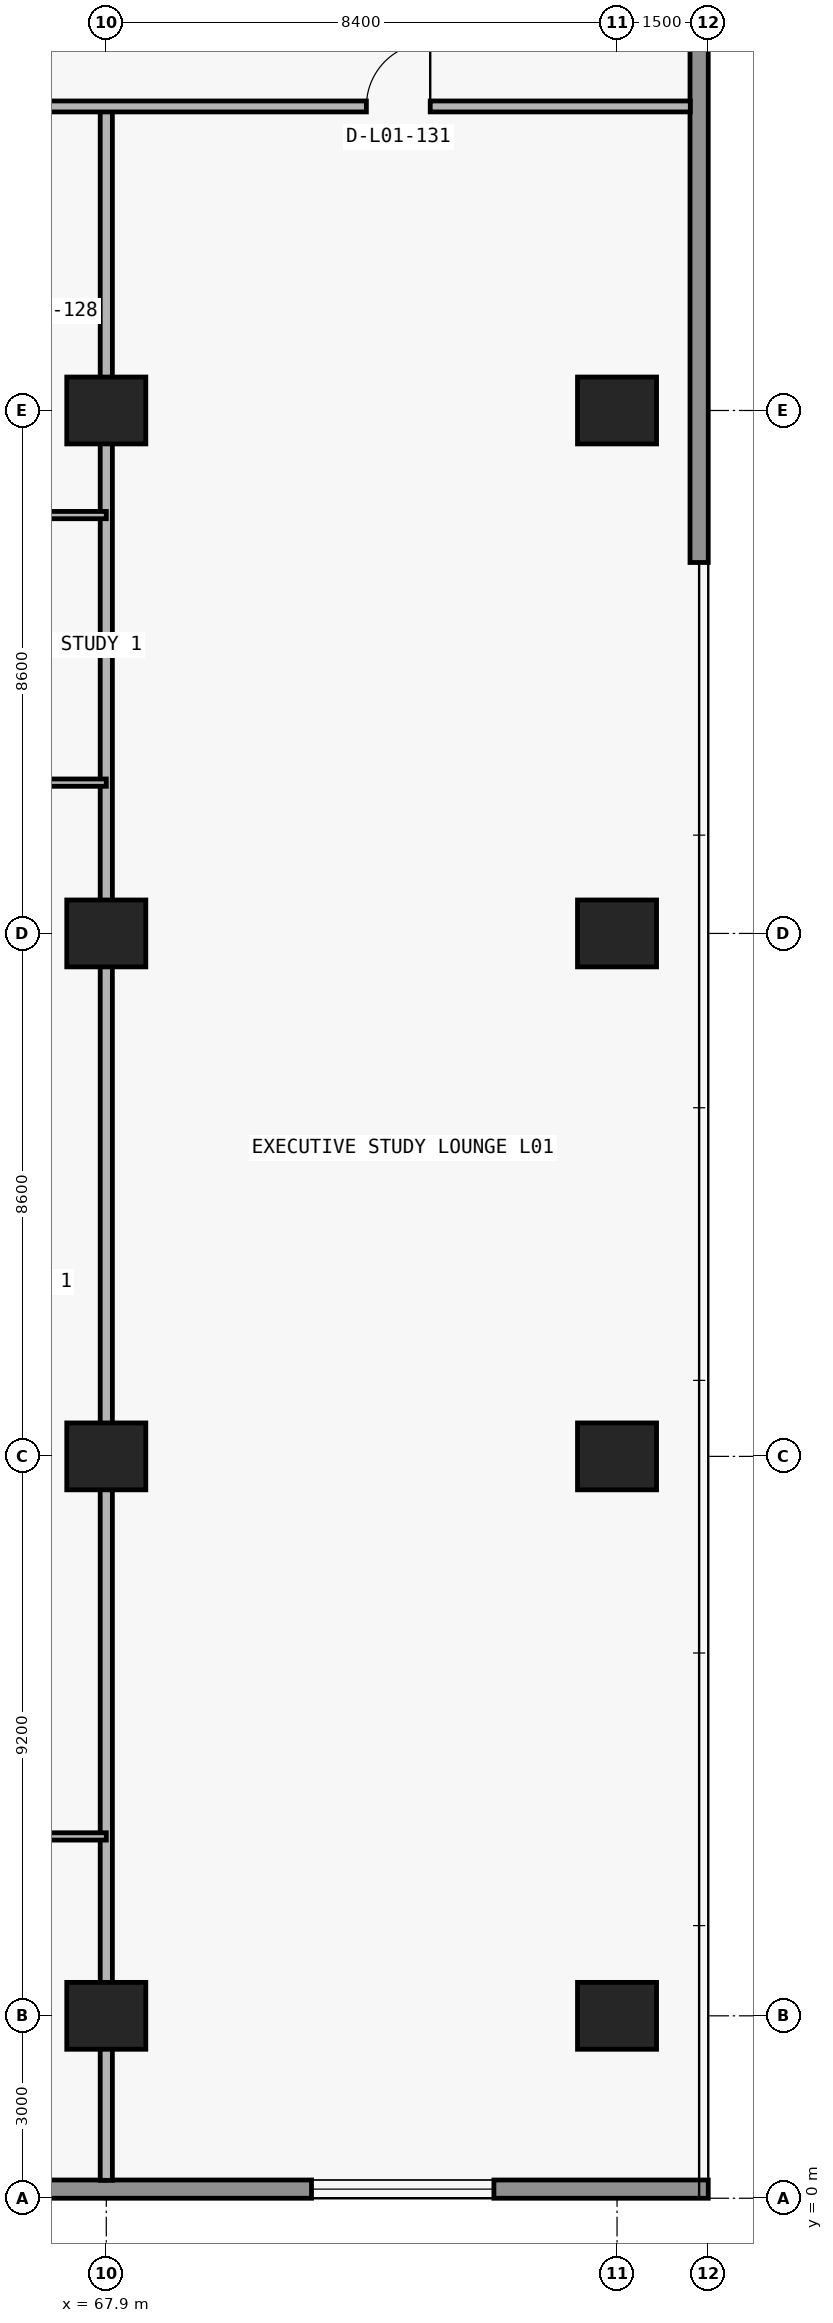
"""IFC4 building model, lengths in metres.
Left out: names, types, materials, properties, quantities, classifications, styles, units other than length and angle.
Written with IfcOpenShell. Run it as: python <this file> out.ifc"""

import sys

from ifc_helpers import new_model, si_unit, direction, frame, frame_2d, origin, origin_2d, place, context, subcontext, project, spatial, rectangle, extrude, element, fill, save


model = new_model("IFC4")
c1 = context("Model", 3, precision=1e-05, world=origin(), true_north=direction((0.0, 1.0)))
c2 = subcontext(c1, "Body", "Model", "MODEL_VIEW")
j1 = project(units=[si_unit("LENGTHUNIT", "METRE"), si_unit("PLANEANGLEUNIT", "RADIAN")], contexts=[c1])
p1 = place(None, origin())
s1 = spatial("IfcSite", under=j1, at=p1, CompositionType="ELEMENT")
p2 = place(p1, origin())
s2 = spatial("IfcBuilding", under=s1, at=p2, CompositionType="ELEMENT")
p3 = place(p2, frame((0.0, 0.0, 5.4)))
s3 = spatial("IfcBuildingStorey", under=s2, at=p3, CompositionType="ELEMENT", Elevation=5.4)
for number, where, z_axis, x_axis in (
    (1, (67.9, 3.0, 0.0), (0.0, 0.0, 1.0), (1.0, 0.0, 0.0)),
    (2, (76.3, 3.0, 0.0), (0.0, 0.0, 1.0), (1.0, 0.0, 0.0)),
    (3, (67.9, 12.2, 0.0), (0.0, 0.0, 1.0), (1.0, 0.0, 0.0)),
    (4, (76.3, 12.2, 0.0), (0.0, 0.0, 1.0), (1.0, 0.0, 0.0)),
    (5, (67.9, 20.8, 0.0), (0.0, 0.0, 1.0), (1.0, 0.0, 0.0)),
    (6, (76.3, 20.8, 0.0), (0.0, 0.0, 1.0), (1.0, 0.0, 0.0)),
    (7, (67.9, 29.4, 0.0), (0.0, 0.0, 1.0), (1.0, 0.0, 0.0)),
    (8, (76.3, 29.4, 0.0), (0.0, 0.0, 1.0), (1.0, 0.0, 0.0)),
):
    element("IfcColumn", number, at=place(p3, frame(where, z_axis=z_axis, x_axis=x_axis)), inside=s3, PredefinedType="COLUMN", context=c2, shape_type="SweptSolid", body=[
        extrude(rectangle(XDim=1.3, YDim=1.1, at=origin_2d()), origin(), (0.0, 0.0, 1.0), 4.5),
    ])
p4 = place(p3, frame((77.8, 0.15, 0.0), z_axis=(0.0, 0.0, 1.0), x_axis=(-1.0, 0.0, 0.0)))
e9 = element("IfcWall", 9, at=p4, inside=s3, PredefinedType="STANDARD", context=c2, shape_type="SweptSolid", body=[
    extrude(rectangle(XDim=77.8, YDim=0.3, at=frame_2d((38.9, 0.0))), origin(), (0.0, 0.0, 1.0), 4.5),
])
p5 = place(p4, frame((62.875, 0.0, 0.85)))
e10 = element("IfcOpeningElement", 10, at=p5, cuts=e9, PredefinedType="OPENING", context=c2, shape_type="SweptSolid", body=[
    extrude(rectangle(XDim=3.0, YDim=2.4, at=frame_2d((1.5, 1.2))), frame((0.0, 0.16, 0.0), z_axis=(0.0, -1.0, 0.0), x_axis=(1.0, 0.0, 0.0)), (0.0, 0.0, 1.0), 0.32),
])
p6 = place(p4, frame((37.4, 0.0, 0.85)))
e11 = element("IfcOpeningElement", 11, at=p6, cuts=e9, PredefinedType="OPENING", context=c2, shape_type="SweptSolid", body=[
    extrude(rectangle(XDim=3.0, YDim=2.4, at=frame_2d((1.5, 1.2))), frame((0.0, 0.16, 0.0), z_axis=(0.0, -1.0, 0.0), x_axis=(1.0, 0.0, 0.0)), (0.0, 0.0, 1.0), 0.32),
])
p7 = place(p4, frame((21.0, 0.0, 0.85)))
e12 = element("IfcOpeningElement", 12, at=p7, cuts=e9, PredefinedType="OPENING", context=c2, shape_type="SweptSolid", body=[
    extrude(rectangle(XDim=3.0, YDim=2.4, at=frame_2d((1.5, 1.2))), frame((0.0, 0.16, 0.0), z_axis=(0.0, -1.0, 0.0), x_axis=(1.0, 0.0, 0.0)), (0.0, 0.0, 1.0), 0.32),
])
p8 = place(p4, frame((13.0, 0.0, 0.85)))
e13 = element("IfcOpeningElement", 13, at=p8, cuts=e9, PredefinedType="OPENING", context=c2, shape_type="SweptSolid", body=[
    extrude(rectangle(XDim=2.2, YDim=1.55, at=frame_2d((1.1, 0.775))), frame((0.0, 0.16, 0.0), z_axis=(0.0, -1.0, 0.0), x_axis=(1.0, 0.0, 0.0)), (0.0, 0.0, 1.0), 0.32),
])
p9 = place(p4, frame((3.525, 0.0, 0.85)))
e14 = element("IfcOpeningElement", 14, at=p9, cuts=e9, PredefinedType="OPENING", context=c2, shape_type="SweptSolid", body=[
    extrude(rectangle(XDim=3.0, YDim=2.4, at=frame_2d((1.5, 1.2))), frame((0.0, 0.16, 0.0), z_axis=(0.0, -1.0, 0.0), x_axis=(1.0, 0.0, 0.0)), (0.0, 0.0, 1.0), 0.32),
])
p10 = place(p3, frame((77.65, 53.8, 0.0), z_axis=(0.0, 0.0, 1.0), x_axis=(0.0, -1.0, 0.0)))
e15 = element("IfcWall", 15, at=p10, inside=s3, PredefinedType="STANDARD", context=c2, shape_type="SweptSolid", body=[
    extrude(rectangle(XDim=26.9, YDim=0.3, at=frame_2d((13.45, 0.0))), origin(), (0.0, 0.0, 1.0), 4.5),
])
p11 = place(p3, frame((67.9, 0.295, 0.0), z_axis=(0.0, 0.0, 1.0), x_axis=(0.0, 1.0, 0.0)))
e16 = element("IfcWall", 16, at=p11, inside=s3, PredefinedType="PARTITIONING", context=c2, shape_type="SweptSolid", body=[
    extrude(rectangle(XDim=34.105, YDim=0.2, at=frame_2d((17.052, 0.0))), origin(), (0.0, 0.0, 1.0), 3.464),
])
p12 = place(p3, frame((59.5, 5.95, 0.0), z_axis=(0.0, 0.0, 1.0), x_axis=(1.0, 0.0, 0.0)))
e17 = element("IfcWall", 17, at=p12, inside=s3, PredefinedType="PARTITIONING", context=c2, shape_type="SweptSolid", body=[
    extrude(rectangle(XDim=8.4, YDim=0.12, at=frame_2d((4.2, 0.0))), origin(), (0.0, 0.0, 1.0), 4.5),
])
p13 = place(p12, frame((3.75, 0.0, 0.0)))
e18 = element("IfcOpeningElement", 18, at=p13, cuts=e17, PredefinedType="OPENING", context=c2, shape_type="SweptSolid", body=[
    extrude(rectangle(XDim=0.9, YDim=2.15, at=frame_2d((0.45, 1.075))), frame((0.0, 0.07, 0.0), z_axis=(0.0, -1.0, 0.0), x_axis=(1.0, 0.0, 0.0)), (0.0, 0.0, 1.0), 0.14),
])
p14 = place(p3, frame((59.5, 23.28, 0.0), z_axis=(0.0, 0.0, 1.0), x_axis=(1.0, 0.0, 0.0)))
e19 = element("IfcWall", 19, at=p14, inside=s3, PredefinedType="PARTITIONING", context=c2, shape_type="SweptSolid", body=[
    extrude(rectangle(XDim=8.4, YDim=0.12, at=frame_2d((4.2, 0.0))), origin(), (0.0, 0.0, 1.0), 4.5),
])
p15 = place(p14, frame((3.75, 0.0, 0.0)))
e20 = element("IfcOpeningElement", 20, at=p15, cuts=e19, PredefinedType="OPENING", context=c2, shape_type="SweptSolid", body=[
    extrude(rectangle(XDim=0.9, YDim=2.15, at=frame_2d((0.45, 1.075))), frame((0.0, 0.07, 0.0), z_axis=(0.0, -1.0, 0.0), x_axis=(1.0, 0.0, 0.0)), (0.0, 0.0, 1.0), 0.14),
])
p16 = place(p3, frame((59.5, 27.68, 0.0), z_axis=(0.0, 0.0, 1.0), x_axis=(1.0, 0.0, 0.0)))
e21 = element("IfcWall", 21, at=p16, inside=s3, PredefinedType="PARTITIONING", context=c2, shape_type="SweptSolid", body=[
    extrude(rectangle(XDim=8.4, YDim=0.12, at=frame_2d((4.2, 0.0))), origin(), (0.0, 0.0, 1.0), 4.5),
])
p17 = place(p16, frame((3.0, 0.0, 0.0)))
e22 = element("IfcOpeningElement", 22, at=p17, cuts=e21, PredefinedType="OPENING", context=c2, shape_type="SweptSolid", body=[
    extrude(rectangle(XDim=0.9, YDim=2.15, at=frame_2d((0.45, 1.075))), frame((0.0, 0.07, 0.0), z_axis=(0.0, -1.0, 0.0), x_axis=(1.0, 0.0, 0.0)), (0.0, 0.0, 1.0), 0.14),
])
p18 = place(p3, frame((0.295, 34.4, 0.0), z_axis=(0.0, 0.0, 1.0), x_axis=(1.0, 0.0, 0.0)))
e23 = element("IfcWall", 23, at=p18, inside=s3, PredefinedType="PARTITIONING", context=c2, shape_type="SweptSolid", body=[
    extrude(rectangle(XDim=77.21, YDim=0.18, at=frame_2d((38.605, 0.0))), origin(), (0.0, 0.0, 1.0), 4.5),
])
p19 = place(p18, frame((12.677, 0.0, 0.0)))
e24 = element("IfcOpeningElement", 24, at=p19, cuts=e23, PredefinedType="OPENING", context=c2, shape_type="SweptSolid", body=[
    extrude(rectangle(XDim=1.05, YDim=2.15, at=frame_2d((0.525, 1.075))), frame((0.0, 0.1, 0.0), z_axis=(0.0, -1.0, 0.0), x_axis=(1.0, 0.0, 0.0)), (0.0, 0.0, 1.0), 0.2),
])
p20 = place(p18, frame((38.08, 0.0, 0.0)))
e25 = element("IfcOpeningElement", 25, at=p20, cuts=e23, PredefinedType="OPENING", context=c2, shape_type="SweptSolid", body=[
    extrude(rectangle(XDim=1.05, YDim=2.15, at=frame_2d((0.525, 1.075))), frame((0.0, 0.1, 0.0), z_axis=(0.0, -1.0, 0.0), x_axis=(1.0, 0.0, 0.0)), (0.0, 0.0, 1.0), 0.2),
])
p21 = place(p18, frame((53.715, 0.0, 0.0)))
e26 = element("IfcOpeningElement", 26, at=p21, cuts=e23, PredefinedType="OPENING", context=c2, shape_type="SweptSolid", body=[
    extrude(rectangle(XDim=1.0, YDim=2.2, at=frame_2d((0.5, 1.1))), frame((0.0, 0.1, 0.0), z_axis=(0.0, -1.0, 0.0), x_axis=(1.0, 0.0, 0.0)), (0.0, 0.0, 1.0), 0.2),
])
p22 = place(p18, frame((71.883, 0.0, 0.0)))
e27 = element("IfcOpeningElement", 27, at=p22, cuts=e23, PredefinedType="OPENING", context=c2, shape_type="SweptSolid", body=[
    extrude(rectangle(XDim=1.05, YDim=2.15, at=frame_2d((0.525, 1.075))), frame((0.0, 0.1, 0.0), z_axis=(0.0, -1.0, 0.0), x_axis=(1.0, 0.0, 0.0)), (0.0, 0.0, 1.0), 0.2),
])
p23 = place(p9, origin())
e28 = element("IfcWindow", 28, at=p23, inside=s3, PartitioningType="SINGLE_PANEL", PredefinedType="WINDOW", context=c2, shape_type="SweptSolid", body=[
    extrude(rectangle(XDim=3.0, YDim=2.4, at=frame_2d((1.5, 1.2))), frame((0.0, 0.03, 0.0), z_axis=(0.0, -1.0, 0.0), x_axis=(1.0, 0.0, 0.0)), (0.0, 0.0, 1.0), 0.06),
])
fill(e14, e28)
p24 = place(p22, origin())
e29 = element("IfcDoor", 29, at=p24, inside=s3, OperationType="SINGLE_SWING_RIGHT", PredefinedType="DOOR", context=c2, shape_type="SweptSolid", body=[
    extrude(rectangle(XDim=1.05, YDim=2.15, at=frame_2d((0.525, 1.075))), frame((0.0, 0.025, 0.0), z_axis=(0.0, -1.0, 0.0), x_axis=(1.0, 0.0, 0.0)), (0.0, 0.0, 1.0), 0.05),
])
fill(e27, e29)
save(model, sys.argv[1])
